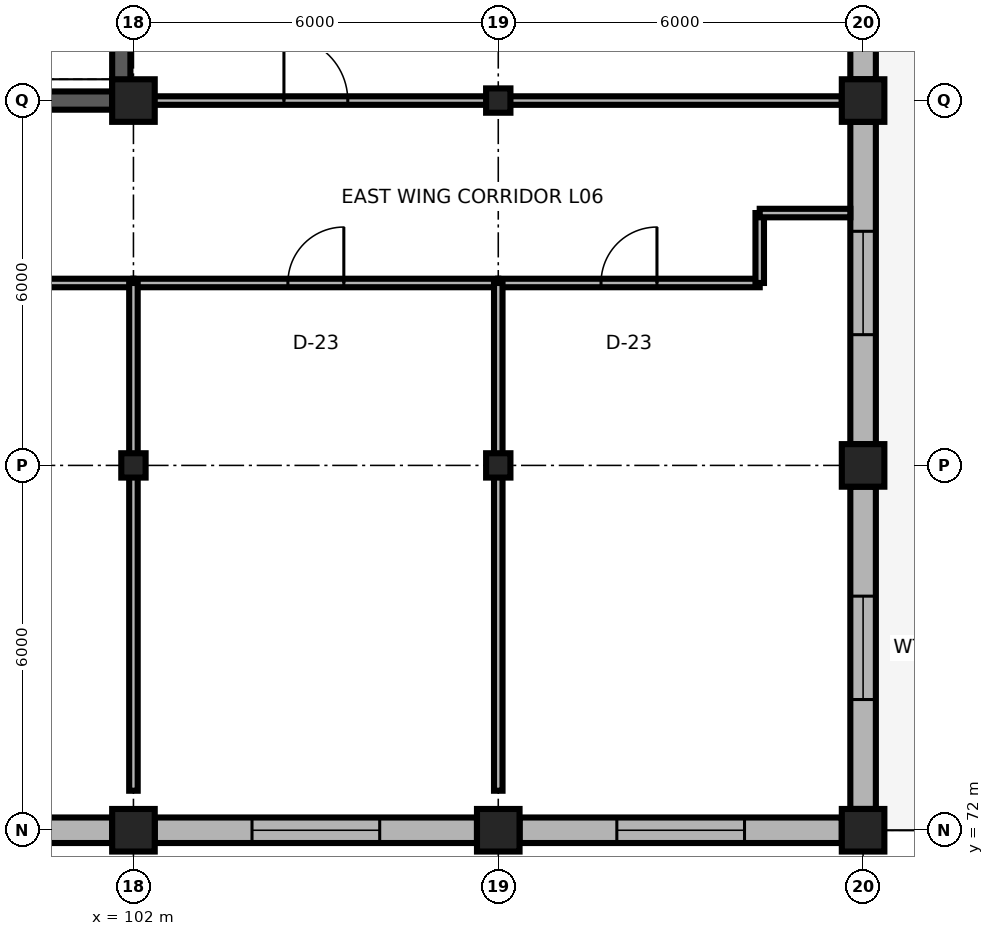
"""IFC4 building model, lengths in metres.
Left out: names, types, materials, properties, quantities, classifications, styles, units other than length and angle.
Written with IfcOpenShell. Run it as: python <this file> out.ifc"""

import sys

from ifc_helpers import new_model, si_unit, direction, frame, frame_2d, origin, origin_2d, place, context, subcontext, project, spatial, rectangle, i_section, extrude, element, fill, save


model = new_model("IFC4")
c1 = context("Model", 3, precision=1e-05, world=origin(), true_north=direction((0.0, 1.0)))
c2 = subcontext(c1, "Body", "Model", "MODEL_VIEW")
j1 = project(units=[si_unit("LENGTHUNIT", "METRE"), si_unit("PLANEANGLEUNIT", "RADIAN")], contexts=[c1])
p1 = place(None, origin())
s1 = spatial("IfcSite", under=j1, at=p1, CompositionType="ELEMENT")
p2 = place(p1, origin())
s2 = spatial("IfcBuilding", under=s1, at=p2, CompositionType="ELEMENT")
p3 = place(p2, frame((0.0, 0.0, 24.9)))
s3 = spatial("IfcBuildingStorey", under=s2, at=p3, CompositionType="ELEMENT", Elevation=24.9)
for number, where, z_axis, x_axis in (
    (1, (102.0, 72.0, 0.0), (0.0, 0.0, 1.0), (1.0, 0.0, 0.0)),
    (2, (108.0, 72.0, 0.0), (0.0, 0.0, 1.0), (1.0, 0.0, 0.0)),
    (3, (114.0, 72.0, 0.0), (0.0, 0.0, 1.0), (1.0, 0.0, 0.0)),
):
    element("IfcColumn", number, at=place(p3, frame(where, z_axis=z_axis, x_axis=x_axis)), inside=s3, PredefinedType="COLUMN", context=c2, shape_type="SweptSolid", body=[
        extrude(rectangle(XDim=0.7, YDim=0.7, at=origin_2d()), origin(), (0.0, 0.0, 1.0), 3.9),
    ])
for number, where, z_axis, x_axis in (
    (4, (102.0, 78.0, 0.0), (0.0, 0.0, 1.0), (1.0, 0.0, 0.0)),
    (5, (108.0, 78.0, 0.0), (0.0, 0.0, 1.0), (1.0, 0.0, 0.0)),
):
    element("IfcColumn", number, at=place(p3, frame(where, z_axis=z_axis, x_axis=x_axis)), inside=s3, PredefinedType="COLUMN", context=c2, shape_type="SweptSolid", body=[
        extrude(i_section(OverallWidth=0.4, OverallDepth=0.4, WebThickness=0.013, FlangeThickness=0.021, FilletRadius=0.022, at=origin_2d()), origin(), (0.0, 0.0, 1.0), 3.9),
    ])
for number, where, z_axis, x_axis in (
    (6, (114.0, 78.0, 0.0), (0.0, 0.0, 1.0), (1.0, 0.0, 0.0)),
    (7, (102.0, 84.0, 0.0), (0.0, 0.0, 1.0), (1.0, 0.0, 0.0)),
):
    element("IfcColumn", number, at=place(p3, frame(where, z_axis=z_axis, x_axis=x_axis)), inside=s3, PredefinedType="COLUMN", context=c2, shape_type="SweptSolid", body=[
        extrude(rectangle(XDim=0.7, YDim=0.7, at=origin_2d()), origin(), (0.0, 0.0, 1.0), 3.9),
    ])
p4 = place(p3, frame((108.0, 84.0, 0.0), z_axis=(0.0, 0.0, 1.0), x_axis=(1.0, 0.0, 0.0)))
e8 = element("IfcColumn", 8, at=p4, inside=s3, PredefinedType="COLUMN", context=c2, shape_type="SweptSolid", body=[
    extrude(i_section(OverallWidth=0.4, OverallDepth=0.4, WebThickness=0.013, FlangeThickness=0.021, FilletRadius=0.022, at=origin_2d()), origin(), (0.0, 0.0, 1.0), 3.9),
])
p5 = place(p3, frame((114.0, 84.0, 0.0), z_axis=(0.0, 0.0, 1.0), x_axis=(1.0, 0.0, 0.0)))
e9 = element("IfcColumn", 9, at=p5, inside=s3, PredefinedType="COLUMN", context=c2, shape_type="SweptSolid", body=[
    extrude(rectangle(XDim=0.7, YDim=0.7, at=origin_2d()), origin(), (0.0, 0.0, 1.0), 3.9),
])
p6 = place(p3, frame((96.35, 72.0, 0.0), z_axis=(0.0, 0.0, 1.0), x_axis=(1.0, 0.0, 0.0)))
e10 = element("IfcWall", 10, at=p6, inside=s3, PredefinedType="SOLIDWALL", context=c2, shape_type="SweptSolid", body=[
    extrude(rectangle(XDim=5.3, YDim=0.42, at=frame_2d((2.65, 0.0))), origin(), (0.0, 0.0, 1.0), 3.32),
])
p7 = place(p6, frame((1.6, 0.0, 0.85)))
e11 = element("IfcOpeningElement", 11, at=p7, cuts=e10, PredefinedType="OPENING", context=c2, shape_type="SweptSolid", body=[
    extrude(rectangle(XDim=2.1, YDim=2.1, at=frame_2d((1.05, 1.05))), frame((0.0, 0.225, 0.0), z_axis=(0.0, -1.0, 0.0), x_axis=(1.0, 0.0, 0.0)), (0.0, 0.0, 1.0), 0.45),
])
p8 = place(p3, frame((102.35, 72.0, 0.0), z_axis=(0.0, 0.0, 1.0), x_axis=(1.0, 0.0, 0.0)))
e12 = element("IfcWall", 12, at=p8, inside=s3, PredefinedType="SOLIDWALL", context=c2, shape_type="SweptSolid", body=[
    extrude(rectangle(XDim=5.3, YDim=0.42, at=frame_2d((2.65, 0.0))), origin(), (0.0, 0.0, 1.0), 3.32),
])
p9 = place(p8, frame((1.6, 0.0, 0.85)))
e13 = element("IfcOpeningElement", 13, at=p9, cuts=e12, PredefinedType="OPENING", context=c2, shape_type="SweptSolid", body=[
    extrude(rectangle(XDim=2.1, YDim=2.1, at=frame_2d((1.05, 1.05))), frame((0.0, 0.225, 0.0), z_axis=(0.0, -1.0, 0.0), x_axis=(1.0, 0.0, 0.0)), (0.0, 0.0, 1.0), 0.45),
])
p10 = place(p3, frame((108.35, 72.0, 0.0), z_axis=(0.0, 0.0, 1.0), x_axis=(1.0, 0.0, 0.0)))
e14 = element("IfcWall", 14, at=p10, inside=s3, PredefinedType="SOLIDWALL", context=c2, shape_type="SweptSolid", body=[
    extrude(rectangle(XDim=5.3, YDim=0.42, at=frame_2d((2.65, 0.0))), origin(), (0.0, 0.0, 1.0), 3.32),
])
p11 = place(p10, frame((1.6, 0.0, 0.85)))
e15 = element("IfcOpeningElement", 15, at=p11, cuts=e14, PredefinedType="OPENING", context=c2, shape_type="SweptSolid", body=[
    extrude(rectangle(XDim=2.1, YDim=2.1, at=frame_2d((1.05, 1.05))), frame((0.0, 0.225, 0.0), z_axis=(0.0, -1.0, 0.0), x_axis=(1.0, 0.0, 0.0)), (0.0, 0.0, 1.0), 0.45),
])
p12 = place(p3, frame((114.0, 72.35, 0.0), z_axis=(0.0, 0.0, 1.0), x_axis=(0.0, 1.0, 0.0)))
e16 = element("IfcWall", 16, at=p12, inside=s3, PredefinedType="SOLIDWALL", context=c2, shape_type="SweptSolid", body=[
    extrude(rectangle(XDim=5.3, YDim=0.42, at=frame_2d((2.65, 0.0))), origin(), (0.0, 0.0, 1.0), 3.32),
])
p13 = place(p12, frame((1.8, 0.0, 0.85)))
e17 = element("IfcOpeningElement", 17, at=p13, cuts=e16, PredefinedType="OPENING", context=c2, shape_type="SweptSolid", body=[
    extrude(rectangle(XDim=1.7, YDim=2.05, at=frame_2d((0.85, 1.025))), frame((0.0, 0.225, 0.0), z_axis=(0.0, -1.0, 0.0), x_axis=(1.0, 0.0, 0.0)), (0.0, 0.0, 1.0), 0.45),
])
p14 = place(p3, frame((114.0, 78.35, 0.0), z_axis=(0.0, 0.0, 1.0), x_axis=(0.0, 1.0, 0.0)))
e18 = element("IfcWall", 18, at=p14, inside=s3, PredefinedType="SOLIDWALL", context=c2, shape_type="SweptSolid", body=[
    extrude(rectangle(XDim=5.3, YDim=0.42, at=frame_2d((2.65, 0.0))), origin(), (0.0, 0.0, 1.0), 3.32),
])
p15 = place(p14, frame((1.8, 0.0, 0.85)))
e19 = element("IfcOpeningElement", 19, at=p15, cuts=e18, PredefinedType="OPENING", context=c2, shape_type="SweptSolid", body=[
    extrude(rectangle(XDim=1.7, YDim=2.05, at=frame_2d((0.85, 1.025))), frame((0.0, 0.225, 0.0), z_axis=(0.0, -1.0, 0.0), x_axis=(1.0, 0.0, 0.0)), (0.0, 0.0, 1.0), 0.45),
])
p16 = place(p3, frame((114.0, 84.35, 0.0), z_axis=(0.0, 0.0, 1.0), x_axis=(0.0, 1.0, 0.0)))
e20 = element("IfcWall", 20, at=p16, inside=s3, PredefinedType="SOLIDWALL", context=c2, shape_type="SweptSolid", body=[
    extrude(rectangle(XDim=5.3, YDim=0.42, at=frame_2d((2.65, 0.0))), origin(), (0.0, 0.0, 1.0), 3.32),
])
p17 = place(p16, frame((1.8, 0.0, 0.85)))
e21 = element("IfcOpeningElement", 21, at=p17, cuts=e20, PredefinedType="OPENING", context=c2, shape_type="SweptSolid", body=[
    extrude(rectangle(XDim=1.7, YDim=2.05, at=frame_2d((0.85, 1.025))), frame((0.0, 0.225, 0.0), z_axis=(0.0, -1.0, 0.0), x_axis=(1.0, 0.0, 0.0)), (0.0, 0.0, 1.0), 0.45),
])
p18 = place(p3, frame((96.35, 84.0, 0.0), z_axis=(0.0, 0.0, 1.0), x_axis=(1.0, 0.0, 0.0)))
e22 = element("IfcWall", 22, at=p18, inside=s3, PredefinedType="SHEAR", context=c2, shape_type="SweptSolid", body=[
    extrude(rectangle(XDim=5.3, YDim=0.3, at=frame_2d((2.65, 0.0))), origin(), (0.0, 0.0, 1.0), 3.66),
])
p19 = place(p18, frame((1.975, 0.0, 0.0)))
e23 = element("IfcOpeningElement", 23, at=p19, cuts=e22, PredefinedType="OPENING", context=c2, shape_type="SweptSolid", body=[
    extrude(rectangle(XDim=1.35, YDim=2.2, at=frame_2d((0.675, 1.1))), frame((0.0, 0.165, 0.0), z_axis=(0.0, -1.0, 0.0), x_axis=(1.0, 0.0, 0.0)), (0.0, 0.0, 1.0), 0.33),
])
p20 = place(p3, frame((101.8, 84.0, 0.0), z_axis=(0.0, 0.0, 1.0), x_axis=(0.0, 1.0, 0.0)))
e24 = element("IfcWall", 24, at=p20, inside=s3, PredefinedType="SHEAR", context=c2, shape_type="SweptSolid", body=[
    extrude(rectangle(XDim=11.8, YDim=0.3, at=frame_2d((5.9, 0.0))), origin(), (0.0, 0.0, 1.0), 3.74),
])
p21 = place(p3, frame((96.0, 81.0, 0.0), z_axis=(0.0, 0.0, 1.0), x_axis=(1.0, 0.0, 0.0)))
e25 = element("IfcWall", 25, at=p21, inside=s3, PredefinedType="PARTITIONING", context=c2, shape_type="SweptSolid", body=[
    extrude(rectangle(XDim=6.0, YDim=0.14, at=frame_2d((3.0, 0.0))), origin(), (0.0, 0.0, 1.0), 3.74),
])
p22 = place(p21, frame((2.54, 0.0, 0.0)))
e26 = element("IfcOpeningElement", 26, at=p22, cuts=e25, PredefinedType="OPENING", context=c2, shape_type="SweptSolid", body=[
    extrude(rectangle(XDim=0.92, YDim=2.15, at=frame_2d((0.46, 1.075))), frame((0.0, 0.085, 0.0), z_axis=(0.0, -1.0, 0.0), x_axis=(1.0, 0.0, 0.0)), (0.0, 0.0, 1.0), 0.17),
])
p23 = place(p3, frame((102.0, 81.0, 0.0), z_axis=(0.0, 0.0, 1.0), x_axis=(1.0, 0.0, 0.0)))
e27 = element("IfcWall", 27, at=p23, inside=s3, PredefinedType="PARTITIONING", context=c2, shape_type="SweptSolid", body=[
    extrude(rectangle(XDim=6.0, YDim=0.14, at=frame_2d((3.0, 0.0))), origin(), (0.0, 0.0, 1.0), 3.74),
])
p24 = place(p23, frame((2.54, 0.0, 0.0)))
e28 = element("IfcOpeningElement", 28, at=p24, cuts=e27, PredefinedType="OPENING", context=c2, shape_type="SweptSolid", body=[
    extrude(rectangle(XDim=0.92, YDim=2.15, at=frame_2d((0.46, 1.075))), frame((0.0, 0.085, 0.0), z_axis=(0.0, -1.0, 0.0), x_axis=(1.0, 0.0, 0.0)), (0.0, 0.0, 1.0), 0.17),
])
p25 = place(p3, frame((108.0, 81.0, 0.0), z_axis=(0.0, 0.0, 1.0), x_axis=(1.0, 0.0, 0.0)))
e29 = element("IfcWall", 29, at=p25, inside=s3, PredefinedType="PARTITIONING", context=c2, shape_type="SweptSolid", body=[
    extrude(rectangle(XDim=4.3, YDim=0.14, at=frame_2d((2.15, 0.0))), origin(), (0.0, 0.0, 1.0), 3.74),
])
p26 = place(p25, frame((1.69, 0.0, 0.0)))
e30 = element("IfcOpeningElement", 30, at=p26, cuts=e29, PredefinedType="OPENING", context=c2, shape_type="SweptSolid", body=[
    extrude(rectangle(XDim=0.92, YDim=2.15, at=frame_2d((0.46, 1.075))), frame((0.0, 0.085, 0.0), z_axis=(0.0, -1.0, 0.0), x_axis=(1.0, 0.0, 0.0)), (0.0, 0.0, 1.0), 0.17),
])
p27 = place(p3, frame((102.0, 84.0, 0.0), z_axis=(0.0, 0.0, 1.0), x_axis=(1.0, 0.0, 0.0)))
e31 = element("IfcWall", 31, at=p27, inside=s3, PredefinedType="PARTITIONING", context=c2, shape_type="SweptSolid", body=[
    extrude(rectangle(XDim=6.0, YDim=0.14, at=frame_2d((3.0, 0.0))), origin(), (0.0, 0.0, 1.0), 3.352),
])
p28 = place(p27, frame((2.475, 0.0, 0.0)))
e32 = element("IfcOpeningElement", 32, at=p28, cuts=e31, PredefinedType="OPENING", context=c2, shape_type="SweptSolid", body=[
    extrude(rectangle(XDim=1.05, YDim=2.25, at=frame_2d((0.525, 1.125))), frame((0.0, 0.085, 0.0), z_axis=(0.0, -1.0, 0.0), x_axis=(1.0, 0.0, 0.0)), (0.0, 0.0, 1.0), 0.17),
])
for number, where, z_axis, x_axis in (
    (33, (102.0, 72.65, 0.0), (0.0, 0.0, 1.0), (0.0, 1.0, 0.0)),
    (34, (108.0, 72.65, 0.0), (0.0, 0.0, 1.0), (0.0, 1.0, 0.0)),
):
    element("IfcWall", number, at=place(p3, frame(where, z_axis=z_axis, x_axis=x_axis)), inside=s3, PredefinedType="PARTITIONING", context=c2, shape_type="SweptSolid", body=[
        extrude(rectangle(XDim=8.35, YDim=0.14, at=frame_2d((4.175, 0.0))), origin(), (0.0, 0.0, 1.0), 3.352),
    ])
p29 = place(p3, frame((112.3, 81.0, 0.0), z_axis=(0.0, 0.0, 1.0), x_axis=(0.0, 1.0, 0.0)))
e35 = element("IfcWall", 35, at=p29, inside=s3, PredefinedType="PARTITIONING", context=c2, shape_type="SweptSolid", body=[
    extrude(rectangle(XDim=1.15, YDim=0.14, at=frame_2d((0.575, 0.0))), origin(), (0.0, 0.0, 1.0), 3.74),
])
p30 = place(p3, frame((112.3, 82.15, 0.0), z_axis=(0.0, 0.0, 1.0), x_axis=(1.0, 0.0, 0.0)))
e36 = element("IfcWall", 36, at=p30, inside=s3, PredefinedType="PARTITIONING", context=c2, shape_type="SweptSolid", body=[
    extrude(rectangle(XDim=1.49, YDim=0.14, at=frame_2d((0.745, 0.0))), origin(), (0.0, 0.0, 1.0), 3.74),
])
p31 = place(p3, frame((108.0, 84.0, 0.0), z_axis=(0.0, 0.0, 1.0), x_axis=(1.0, 0.0, 0.0)))
e37 = element("IfcWall", 37, at=p31, inside=s3, PredefinedType="PARTITIONING", context=c2, shape_type="SweptSolid", body=[
    extrude(rectangle(XDim=5.65, YDim=0.14, at=frame_2d((2.825, 0.0))), origin(), (0.0, 0.0, 1.0), 3.352),
])
p32 = place(p9, origin())
e38 = element("IfcWindow", 38, at=p32, inside=s3, PartitioningType="SINGLE_PANEL", PredefinedType="WINDOW", context=c2, shape_type="SweptSolid", body=[
    extrude(rectangle(XDim=2.1, YDim=2.1, at=frame_2d((1.05, 1.05))), frame((0.0, 0.03, 0.0), z_axis=(0.0, -1.0, 0.0), x_axis=(1.0, 0.0, 0.0)), (0.0, 0.0, 1.0), 0.06),
])
fill(e13, e38)
p33 = place(p11, origin())
e39 = element("IfcWindow", 39, at=p33, inside=s3, PartitioningType="SINGLE_PANEL", PredefinedType="WINDOW", context=c2, shape_type="SweptSolid", body=[
    extrude(rectangle(XDim=2.1, YDim=2.1, at=frame_2d((1.05, 1.05))), frame((0.0, 0.03, 0.0), z_axis=(0.0, -1.0, 0.0), x_axis=(1.0, 0.0, 0.0)), (0.0, 0.0, 1.0), 0.06),
])
fill(e15, e39)
p34 = place(p13, origin())
e40 = element("IfcWindow", 40, at=p34, inside=s3, PartitioningType="SINGLE_PANEL", PredefinedType="WINDOW", context=c2, shape_type="SweptSolid", body=[
    extrude(rectangle(XDim=1.7, YDim=2.05, at=frame_2d((0.85, 1.025))), frame((0.0, 0.03, 0.0), z_axis=(0.0, -1.0, 0.0), x_axis=(1.0, 0.0, 0.0)), (0.0, 0.0, 1.0), 0.06),
])
fill(e17, e40)
p35 = place(p15, origin())
e41 = element("IfcWindow", 41, at=p35, inside=s3, PartitioningType="SINGLE_PANEL", PredefinedType="WINDOW", context=c2, shape_type="SweptSolid", body=[
    extrude(rectangle(XDim=1.7, YDim=2.05, at=frame_2d((0.85, 1.025))), frame((0.0, 0.03, 0.0), z_axis=(0.0, -1.0, 0.0), x_axis=(1.0, 0.0, 0.0)), (0.0, 0.0, 1.0), 0.06),
])
fill(e19, e41)
p36 = place(p24, origin())
e42 = element("IfcDoor", 42, at=p36, inside=s3, OperationType="SINGLE_SWING_RIGHT", PredefinedType="DOOR", context=c2, shape_type="SweptSolid", body=[
    extrude(rectangle(XDim=0.92, YDim=2.15, at=frame_2d((0.46, 1.075))), frame((0.0, 0.025, 0.0), z_axis=(0.0, -1.0, 0.0), x_axis=(1.0, 0.0, 0.0)), (0.0, 0.0, 1.0), 0.05),
])
fill(e28, e42)
p37 = place(p26, origin())
e43 = element("IfcDoor", 43, at=p37, inside=s3, OperationType="SINGLE_SWING_RIGHT", PredefinedType="DOOR", context=c2, shape_type="SweptSolid", body=[
    extrude(rectangle(XDim=0.92, YDim=2.15, at=frame_2d((0.46, 1.075))), frame((0.0, 0.025, 0.0), z_axis=(0.0, -1.0, 0.0), x_axis=(1.0, 0.0, 0.0)), (0.0, 0.0, 1.0), 0.05),
])
fill(e30, e43)
p38 = place(p28, origin())
e44 = element("IfcDoor", 44, at=p38, inside=s3, OperationType="SINGLE_SWING_LEFT", PredefinedType="DOOR", context=c2, shape_type="SweptSolid", body=[
    extrude(rectangle(XDim=1.05, YDim=2.25, at=frame_2d((0.525, 1.125))), frame((0.0, 0.025, 0.0), z_axis=(0.0, -1.0, 0.0), x_axis=(1.0, 0.0, 0.0)), (0.0, 0.0, 1.0), 0.05),
])
fill(e32, e44)
save(model, sys.argv[1])
